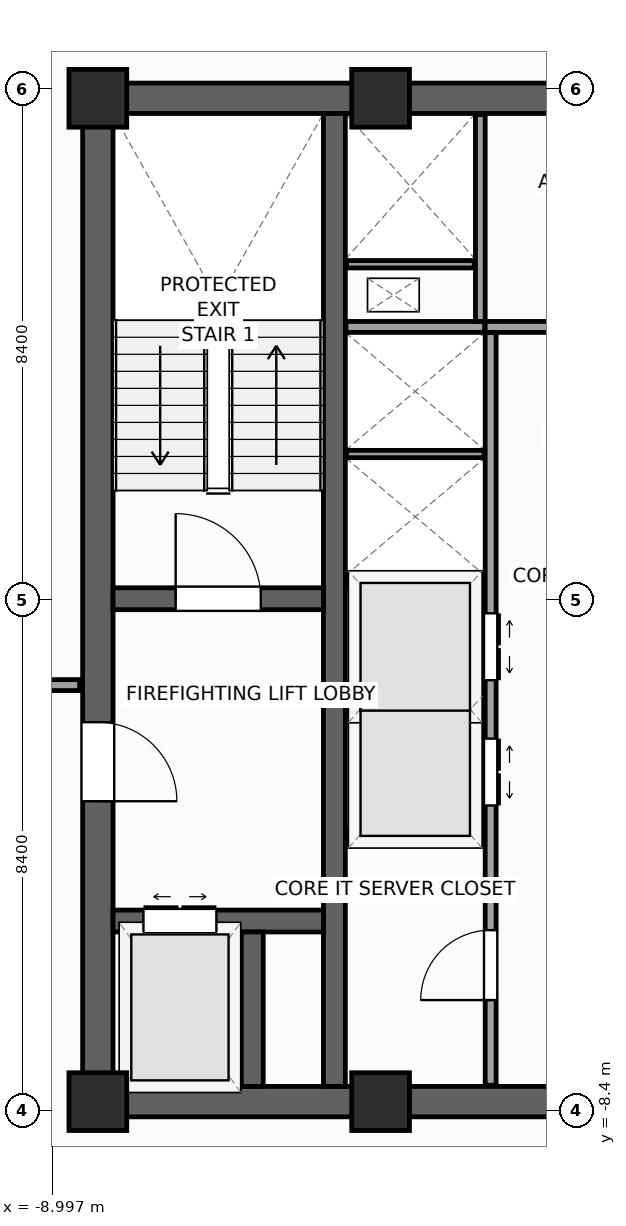
"""IFC4 building model, lengths in metres.
Left out: names, types, materials, properties, quantities, classifications, styles, units other than length and angle.
Written with IfcOpenShell. Run it as: python <this file> out.ifc"""

import sys

from ifc_helpers import new_model, si_unit, direction, frame, frame_2d, origin, origin_2d, place, context, subcontext, project, spatial, rectangle, extrude, source, transform, mapped, element, fill, save


model = new_model("IFC4")
c1 = context("Model", 3, precision=1e-05, world=origin(), true_north=direction((0.0, 1.0)))
c2 = subcontext(c1, "Body", "Model", "MODEL_VIEW")
j1 = project(units=[si_unit("LENGTHUNIT", "METRE"), si_unit("PLANEANGLEUNIT", "RADIAN")], contexts=[c1])
p1 = place(None, origin())
s1 = spatial("IfcSite", under=j1, at=p1, CompositionType="ELEMENT")
p2 = place(p1, origin())
s2 = spatial("IfcBuilding", under=s1, at=p2, CompositionType="ELEMENT")
p3 = place(p2, frame((0.0, 0.0, 205.6)))
s3 = spatial("IfcBuildingStorey", under=s2, at=p3, CompositionType="ELEMENT", Elevation=205.6)
p4 = place(p3, frame((-8.5, -8.25, 0.0), z_axis=(0.0, 0.0, 1.0), x_axis=(1.0, 0.0, 0.0)))
e1 = element("IfcWall", 1, at=p4, inside=s3, PredefinedType="SHEAR", context=c2, shape_type="SweptSolid", body=[
    extrude(rectangle(XDim=17.0, YDim=0.5, at=frame_2d((8.5, 0.0))), origin(), (0.0, 0.0, 1.0), 3.9),
])
p5 = place(p4, frame((7.85, 0.0, 0.0)))
e2 = element("IfcOpeningElement", 2, at=p5, cuts=e1, PredefinedType="OPENING", context=c2, shape_type="SweptSolid", body=[
    extrude(rectangle(XDim=1.3, YDim=2.2, at=frame_2d((0.65, 1.1))), frame((0.0, 0.26, 0.0), z_axis=(0.0, -1.0, 0.0), x_axis=(1.0, 0.0, 0.0)), (0.0, 0.0, 1.0), 0.52),
])
p6 = place(p3, frame((-8.5, 8.25, 0.0), z_axis=(0.0, 0.0, 1.0), x_axis=(1.0, 0.0, 0.0)))
e3 = element("IfcWall", 3, at=p6, inside=s3, PredefinedType="SHEAR", context=c2, shape_type="SweptSolid", body=[
    extrude(rectangle(XDim=17.0, YDim=0.5, at=frame_2d((8.5, 0.0))), origin(), (0.0, 0.0, 1.0), 3.9),
])
p7 = place(p3, frame((-8.25, -8.0, 0.0), z_axis=(0.0, 0.0, 1.0), x_axis=(0.0, 1.0, 0.0)))
e4 = element("IfcWall", 4, at=p7, inside=s3, PredefinedType="SHEAR", context=c2, shape_type="SweptSolid", body=[
    extrude(rectangle(XDim=16.0, YDim=0.5, at=frame_2d((8.0, 0.0))), origin(), (0.0, 0.0, 1.0), 3.9),
])
p8 = place(p7, frame((4.69, 0.0, 0.0)))
e5 = element("IfcOpeningElement", 5, at=p8, cuts=e4, PredefinedType="OPENING", context=c2, shape_type="SweptSolid", body=[
    extrude(rectangle(XDim=1.3, YDim=2.2, at=frame_2d((0.65, 1.1))), frame((0.0, 0.26, 0.0), z_axis=(0.0, -1.0, 0.0), x_axis=(1.0, 0.0, 0.0)), (0.0, 0.0, 1.0), 0.52),
])
p9 = place(p3, frame((-4.36, -8.0, 0.0), z_axis=(0.0, 0.0, 1.0), x_axis=(0.0, 1.0, 0.0)))
e6 = element("IfcWall", 6, at=p9, inside=s3, PredefinedType="SHEAR", context=c2, shape_type="SweptSolid", body=[
    extrude(rectangle(XDim=16.0, YDim=0.36, at=frame_2d((8.0, 0.0))), origin(), (0.0, 0.0, 1.0), 3.9),
])
p10 = place(p3, frame((-8.0, 0.02, 0.0), z_axis=(0.0, 0.0, 1.0), x_axis=(1.0, 0.0, 0.0)))
e7 = element("IfcWall", 7, at=p10, inside=s3, PredefinedType="SHEAR", context=c2, shape_type="SweptSolid", body=[
    extrude(rectangle(XDim=3.46, YDim=0.36, at=frame_2d((1.73, 0.0))), origin(), (0.0, 0.0, 1.0), 3.9),
])
p11 = place(p10, frame((1.03, 0.0, 0.0)))
e8 = element("IfcOpeningElement", 8, at=p11, cuts=e7, PredefinedType="OPENING", context=c2, shape_type="SweptSolid", body=[
    extrude(rectangle(XDim=1.4, YDim=2.2, at=frame_2d((0.7, 1.1))), frame((0.0, 0.19, 0.0), z_axis=(0.0, -1.0, 0.0), x_axis=(1.0, 0.0, 0.0)), (0.0, 0.0, 1.0), 0.38),
])
p12 = place(p3, frame((-8.0, -5.28, 0.0), z_axis=(0.0, 0.0, 1.0), x_axis=(1.0, 0.0, 0.0)))
e9 = element("IfcWall", 9, at=p12, inside=s3, PredefinedType="SHEAR", context=c2, shape_type="SweptSolid", body=[
    extrude(rectangle(XDim=3.46, YDim=0.36, at=frame_2d((1.73, 0.0))), origin(), (0.0, 0.0, 1.0), 3.9),
])
p13 = place(p12, frame((0.5, 0.0, 0.0)))
e10 = element("IfcOpeningElement", 10, at=p13, cuts=e9, PredefinedType="OPENING", context=c2, shape_type="SweptSolid", body=[
    extrude(rectangle(XDim=1.2, YDim=2.25, at=frame_2d((0.6, 1.125))), frame((0.0, 0.19, 0.0), z_axis=(0.0, -1.0, 0.0), x_axis=(1.0, 0.0, 0.0)), (0.0, 0.0, 1.0), 0.38),
])
p14 = place(p3, frame((-5.71, -8.0, 0.0), z_axis=(0.0, 0.0, 1.0), x_axis=(0.0, 1.0, 0.0)))
e11 = element("IfcWall", 11, at=p14, inside=s3, PredefinedType="SHEAR", context=c2, shape_type="SweptSolid", body=[
    extrude(rectangle(XDim=2.54, YDim=0.36, at=frame_2d((1.27, 0.0))), origin(), (0.0, 0.0, 1.0), 3.9),
])
m1 = source(origin(), c2, "Body", "SweptSolid", [
    extrude(rectangle(XDim=0.95, YDim=0.95, at=origin_2d()), origin(), (0.0, 0.0, 1.0), 3.9),
])
for number, where, z_axis, x_axis in (
    (12, (-8.25, -8.25, 0.0), (0.0, 0.0, 1.0), (1.0, 0.0, 0.0)),
    (13, (-8.25, 8.25, 0.0), (0.0, 0.0, 1.0), (1.0, 0.0, 0.0)),
    (14, (-3.6, -8.25, 0.0), (0.0, 0.0, 1.0), (1.0, 0.0, 0.0)),
    (15, (-3.6, 8.25, 0.0), (0.0, 0.0, 1.0), (1.0, 0.0, 0.0)),
):
    element("IfcColumn", number, at=place(p3, frame(where, z_axis=z_axis, x_axis=x_axis)), inside=s3, PredefinedType="PILASTER", context=c2, shape_type="MappedRepresentation", body=[
        mapped(m1, transform((0.0, 0.0, 0.0), scale=1.0)),
    ])
p15 = place(p3, frame((-6.733, 29.154, 0.0), z_axis=(0.0, 0.0, 1.0), x_axis=(-0.629325378072, -0.77714192302, 0.0)))
e16 = element("IfcWall", 16, at=p15, inside=s3, PredefinedType="STANDARD", context=c2, shape_type="SweptSolid", body=[
    extrude(rectangle(XDim=36.84, YDim=0.34, at=frame_2d((18.42, 0.0))), origin(), (0.0, 0.0, 1.0), 2.96),
])
p16 = place(p15, frame((3.721, 0.0, 0.48)))
e17 = element("IfcOpeningElement", 17, at=p16, cuts=e16, PredefinedType="OPENING", context=c2, shape_type="SweptSolid", body=[
    extrude(rectangle(XDim=1.4, YDim=2.4, at=frame_2d((0.7, 1.2))), frame((0.0, 0.18, 0.0), z_axis=(0.0, -1.0, 0.0), x_axis=(1.0, 0.0, 0.0)), (0.0, 0.0, 1.0), 0.36),
])
p17 = place(p15, frame((9.809, 0.0, 0.58)))
e18 = element("IfcOpeningElement", 18, at=p17, cuts=e16, PredefinedType="OPENING", context=c2, shape_type="SweptSolid", body=[
    extrude(rectangle(XDim=1.75, YDim=2.3, at=frame_2d((0.875, 1.15))), frame((0.0, 0.18, 0.0), z_axis=(0.0, -1.0, 0.0), x_axis=(1.0, 0.0, 0.0)), (0.0, 0.0, 1.0), 0.36),
])
p18 = place(p15, frame((16.058, 0.0, 0.58)))
e19 = element("IfcOpeningElement", 19, at=p18, cuts=e16, PredefinedType="OPENING", context=c2, shape_type="SweptSolid", body=[
    extrude(rectangle(XDim=1.75, YDim=2.3, at=frame_2d((0.875, 1.15))), frame((0.0, 0.18, 0.0), z_axis=(0.0, -1.0, 0.0), x_axis=(1.0, 0.0, 0.0)), (0.0, 0.0, 1.0), 0.36),
])
p19 = place(p15, frame((24.176, 0.0, 0.58)))
e20 = element("IfcOpeningElement", 20, at=p19, cuts=e16, PredefinedType="OPENING", context=c2, shape_type="SweptSolid", body=[
    extrude(rectangle(XDim=1.75, YDim=2.3, at=frame_2d((0.875, 1.15))), frame((0.0, 0.18, 0.0), z_axis=(0.0, -1.0, 0.0), x_axis=(1.0, 0.0, 0.0)), (0.0, 0.0, 1.0), 0.36),
])
p20 = place(p15, frame((30.982, 0.0, 0.48)))
e21 = element("IfcOpeningElement", 21, at=p20, cuts=e16, PredefinedType="OPENING", context=c2, shape_type="SweptSolid", body=[
    extrude(rectangle(XDim=1.4, YDim=2.4, at=frame_2d((0.7, 1.2))), frame((0.0, 0.18, 0.0), z_axis=(0.0, -1.0, 0.0), x_axis=(1.0, 0.0, 0.0)), (0.0, 0.0, 1.0), 0.36),
])
p21 = place(p3, frame((-29.154, -6.733, 0.0), z_axis=(0.0, 0.0, 1.0), x_axis=(0.77714192302, -0.629325378072, 0.0)))
e22 = element("IfcWall", 22, at=p21, inside=s3, PredefinedType="STANDARD", context=c2, shape_type="SweptSolid", body=[
    extrude(rectangle(XDim=36.84, YDim=0.34, at=frame_2d((18.42, 0.0))), origin(), (0.0, 0.0, 1.0), 2.96),
])
p22 = place(p21, frame((23.495, 0.0, 0.0)))
e23 = element("IfcOpeningElement", 23, at=p22, cuts=e22, PredefinedType="OPENING", context=c2, shape_type="SweptSolid", body=[
    extrude(rectangle(XDim=1.05, YDim=2.25, at=frame_2d((0.525, 1.125))), frame((0.0, 0.18, 0.0), z_axis=(0.0, -1.0, 0.0), x_axis=(1.0, 0.0, 0.0)), (0.0, 0.0, 1.0), 0.36),
])
p23 = place(p21, frame((3.721, 0.0, 0.48)))
e24 = element("IfcOpeningElement", 24, at=p23, cuts=e22, PredefinedType="OPENING", context=c2, shape_type="SweptSolid", body=[
    extrude(rectangle(XDim=1.4, YDim=2.4, at=frame_2d((0.7, 1.2))), frame((0.0, 0.18, 0.0), z_axis=(0.0, -1.0, 0.0), x_axis=(1.0, 0.0, 0.0)), (0.0, 0.0, 1.0), 0.36),
])
p24 = place(p21, frame((9.809, 0.0, 0.58)))
e25 = element("IfcOpeningElement", 25, at=p24, cuts=e22, PredefinedType="OPENING", context=c2, shape_type="SweptSolid", body=[
    extrude(rectangle(XDim=1.75, YDim=2.3, at=frame_2d((0.875, 1.15))), frame((0.0, 0.18, 0.0), z_axis=(0.0, -1.0, 0.0), x_axis=(1.0, 0.0, 0.0)), (0.0, 0.0, 1.0), 0.36),
])
p25 = place(p21, frame((16.058, 0.0, 0.58)))
e26 = element("IfcOpeningElement", 26, at=p25, cuts=e22, PredefinedType="OPENING", context=c2, shape_type="SweptSolid", body=[
    extrude(rectangle(XDim=1.75, YDim=2.3, at=frame_2d((0.875, 1.15))), frame((0.0, 0.18, 0.0), z_axis=(0.0, -1.0, 0.0), x_axis=(1.0, 0.0, 0.0)), (0.0, 0.0, 1.0), 0.36),
])
p26 = place(p21, frame((25.676, 0.0, 0.58)))
e27 = element("IfcOpeningElement", 27, at=p26, cuts=e22, PredefinedType="OPENING", context=c2, shape_type="SweptSolid", body=[
    extrude(rectangle(XDim=1.75, YDim=2.3, at=frame_2d((0.875, 1.15))), frame((0.0, 0.18, 0.0), z_axis=(0.0, -1.0, 0.0), x_axis=(1.0, 0.0, 0.0)), (0.0, 0.0, 1.0), 0.36),
])
p27 = place(p21, frame((30.982, 0.0, 0.48)))
e28 = element("IfcOpeningElement", 28, at=p27, cuts=e22, PredefinedType="OPENING", context=c2, shape_type="SweptSolid", body=[
    extrude(rectangle(XDim=1.4, YDim=2.4, at=frame_2d((0.7, 1.2))), frame((0.0, 0.18, 0.0), z_axis=(0.0, -1.0, 0.0), x_axis=(1.0, 0.0, 0.0)), (0.0, 0.0, 1.0), 0.36),
])
p28 = place(p3, frame((-1.79, -7.98, 0.0), z_axis=(0.0, 0.0, 1.0), x_axis=(0.0, 1.0, 0.0)))
e29 = element("IfcWall", 29, at=p28, inside=s3, PredefinedType="PARTITIONING", context=c2, shape_type="SweptSolid", body=[
    extrude(rectangle(XDim=12.38, YDim=0.18, at=frame_2d((6.19, 0.0))), origin(), (0.0, 0.0, 1.0), 3.66),
])
p29 = place(p28, frame((4.6, 0.0, 0.0)))
e30 = element("IfcOpeningElement", 30, at=p29, cuts=e29, PredefinedType="OPENING", context=c2, shape_type="SweptSolid", body=[
    extrude(rectangle(XDim=1.1, YDim=2.2, at=frame_2d((0.55, 1.1))), frame((0.0, 0.1, 0.0), z_axis=(0.0, -1.0, 0.0), x_axis=(1.0, 0.0, 0.0)), (0.0, 0.0, 1.0), 0.2),
])
p30 = place(p28, frame((6.66, 0.0, 0.0)))
e31 = element("IfcOpeningElement", 31, at=p30, cuts=e29, PredefinedType="OPENING", context=c2, shape_type="SweptSolid", body=[
    extrude(rectangle(XDim=1.1, YDim=2.2, at=frame_2d((0.55, 1.1))), frame((0.0, 0.1, 0.0), z_axis=(0.0, -1.0, 0.0), x_axis=(1.0, 0.0, 0.0)), (0.0, 0.0, 1.0), 0.2),
])
p31 = place(p28, frame((1.4, 0.0, 0.0)))
e32 = element("IfcOpeningElement", 32, at=p31, cuts=e29, PredefinedType="OPENING", context=c2, shape_type="SweptSolid", body=[
    extrude(rectangle(XDim=1.15, YDim=2.25, at=frame_2d((0.575, 1.125))), frame((0.0, 0.1, 0.0), z_axis=(0.0, -1.0, 0.0), x_axis=(1.0, 0.0, 0.0)), (0.0, 0.0, 1.0), 0.2),
])
p32 = place(p3, frame((-1.88, 4.49, 0.0), z_axis=(0.0, 0.0, 1.0), x_axis=(1.0, 0.0, 0.0)))
e33 = element("IfcWall", 33, at=p32, inside=s3, PredefinedType="PARTITIONING", context=c2, shape_type="SweptSolid", body=[
    extrude(rectangle(XDim=3.76, YDim=0.18, at=frame_2d((1.88, 0.0))), origin(), (0.0, 0.0, 1.0), 3.66),
])
p33 = place(p32, frame((1.305, 0.0, 0.0)))
e34 = element("IfcOpeningElement", 34, at=p33, cuts=e33, PredefinedType="OPENING", context=c2, shape_type="SweptSolid", body=[
    extrude(rectangle(XDim=1.15, YDim=2.25, at=frame_2d((0.575, 1.125))), frame((0.0, 0.1, 0.0), z_axis=(0.0, -1.0, 0.0), x_axis=(1.0, 0.0, 0.0)), (0.0, 0.0, 1.0), 0.2),
])
for number, where, z_axis, x_axis in (
    (35, (-4.17, -3.9, 0.0), (0.0, 0.0, 1.0), (1.0, 0.0, 0.0)),
    (36, (-4.17, 0.3, 0.0), (0.0, 0.0, 1.0), (1.0, 0.0, 0.0)),
    (37, (-4.17, 4.49, 0.0), (0.0, 0.0, 1.0), (1.0, 0.0, 0.0)),
):
    element("IfcWall", number, at=place(p3, frame(where, z_axis=z_axis, x_axis=x_axis)), inside=s3, PredefinedType="PARTITIONING", context=c2, shape_type="SweptSolid", body=[
        extrude(rectangle(XDim=2.28, YDim=0.18, at=frame_2d((1.14, 0.0))), origin(), (0.0, 0.0, 1.0), 3.66),
    ])
for number, where, z_axis, x_axis in (
    (38, (-4.16, -1.8, 0.0), (0.0, 0.0, 1.0), (1.0, 0.0, 0.0)),
    (39, (-4.16, 2.4, 0.0), (0.0, 0.0, 1.0), (1.0, 0.0, 0.0)),
):
    element("IfcWall", number, at=place(p3, frame(where, z_axis=z_axis, x_axis=x_axis)), inside=s3, PredefinedType="PARTITIONING", context=c2, shape_type="SweptSolid", body=[
        extrude(rectangle(XDim=2.26, YDim=0.12, at=frame_2d((1.13, 0.0))), origin(), (0.0, 0.0, 1.0), 3.66),
    ])
p34 = place(p3, frame((-1.96, 4.58, 0.0), z_axis=(0.0, 0.0, 1.0), x_axis=(0.0, 1.0, 0.0)))
e40 = element("IfcWall", 40, at=p34, inside=s3, PredefinedType="PARTITIONING", context=c2, shape_type="SweptSolid", body=[
    extrude(rectangle(XDim=3.4, YDim=0.16, at=frame_2d((1.7, 0.0))), origin(), (0.0, 0.0, 1.0), 3.66),
])
p35 = place(p3, frame((-4.16, 5.52, 0.0), z_axis=(0.0, 0.0, 1.0), x_axis=(1.0, 0.0, 0.0)))
e41 = element("IfcWall", 41, at=p35, inside=s3, PredefinedType="PARTITIONING", context=c2, shape_type="SweptSolid", body=[
    extrude(rectangle(XDim=2.1, YDim=0.12, at=frame_2d((1.05, 0.0))), origin(), (0.0, 0.0, 1.0), 3.66),
])
p36 = place(p3, frame((-11.45, -1.4, 0.0), z_axis=(0.0, 0.0, 1.0), x_axis=(1.0, 0.0, 0.0)))
e42 = element("IfcWall", 42, at=p36, inside=s3, PredefinedType="PARTITIONING", context=c2, shape_type="SweptSolid", body=[
    extrude(rectangle(XDim=2.9, YDim=0.18, at=frame_2d((1.45, 0.0))), origin(), (0.0, 0.0, 1.0), 3.66),
])
p37 = place(p36, frame((0.9, 0.0, 0.0)))
e43 = element("IfcOpeningElement", 43, at=p37, cuts=e42, PredefinedType="OPENING", context=c2, shape_type="SweptSolid", body=[
    extrude(rectangle(XDim=1.1, YDim=2.2, at=frame_2d((0.55, 1.1))), frame((0.0, 0.1, 0.0), z_axis=(0.0, -1.0, 0.0), x_axis=(1.0, 0.0, 0.0)), (0.0, 0.0, 1.0), 0.2),
])
m2 = source(origin(), c2, "Body", "SweptSolid", [
    extrude(rectangle(XDim=1.4, YDim=2.2, at=frame_2d((0.7, 1.1))), frame((0.0, 0.025, 0.0), z_axis=(0.0, -1.0, 0.0), x_axis=(1.0, 0.0, 0.0)), (0.0, 0.0, 1.0), 0.05),
])
p38 = place(p11, origin())
e44 = element("IfcDoor", 44, at=p38, inside=s3, OperationType="SINGLE_SWING_LEFT", PredefinedType="DOOR", context=c2, shape_type="MappedRepresentation", body=[
    mapped(m2, transform((0.0, 0.0, 0.0), scale=1.0)),
])
fill(e8, e44)
m3 = source(origin(), c2, "Body", "SweptSolid", [
    extrude(rectangle(XDim=1.3, YDim=2.2, at=frame_2d((0.65, 1.1))), frame((0.0, 0.025, 0.0), z_axis=(0.0, -1.0, 0.0), x_axis=(1.0, 0.0, 0.0)), (0.0, 0.0, 1.0), 0.05),
])
p39 = place(p8, frame((1.3, 0.0, 0.0), z_axis=(0.0, 0.0, 1.0), x_axis=(-1.0, 0.0, 0.0)))
e45 = element("IfcDoor", 45, at=p39, inside=s3, OperationType="SINGLE_SWING_LEFT", PredefinedType="DOOR", context=c2, shape_type="MappedRepresentation", body=[
    mapped(m3, transform((0.0, 0.0, 0.0), scale=1.0)),
])
fill(e5, e45)
m4 = source(origin(), c2, "Body", "SweptSolid", [
    extrude(rectangle(XDim=1.2, YDim=2.25, at=frame_2d((0.6, 1.125))), frame((0.0, 0.025, 0.0), z_axis=(0.0, -1.0, 0.0), x_axis=(1.0, 0.0, 0.0)), (0.0, 0.0, 1.0), 0.05),
])
p40 = place(p13, origin())
e46 = element("IfcDoor", 46, at=p40, inside=s3, OperationType="DOUBLE_DOOR_SLIDING", PredefinedType="DOOR", context=c2, shape_type="MappedRepresentation", body=[
    mapped(m4, transform((0.0, 0.0, 0.0), scale=1.0)),
])
fill(e10, e46)
m5 = source(origin(), c2, "Body", "SweptSolid", [
    extrude(rectangle(XDim=1.1, YDim=2.2, at=frame_2d((0.55, 1.1))), frame((0.0, 0.025, 0.0), z_axis=(0.0, -1.0, 0.0), x_axis=(1.0, 0.0, 0.0)), (0.0, 0.0, 1.0), 0.05),
])
p41 = place(p29, frame((1.1, 0.0, 0.0), z_axis=(0.0, 0.0, 1.0), x_axis=(-1.0, 0.0, 0.0)))
e47 = element("IfcDoor", 47, at=p41, inside=s3, OperationType="DOUBLE_DOOR_SLIDING", PredefinedType="DOOR", context=c2, shape_type="MappedRepresentation", body=[
    mapped(m5, transform((0.0, 0.0, 0.0), scale=1.0)),
])
fill(e30, e47)
p42 = place(p30, frame((1.1, 0.0, 0.0), z_axis=(0.0, 0.0, 1.0), x_axis=(-1.0, 0.0, 0.0)))
e48 = element("IfcDoor", 48, at=p42, inside=s3, OperationType="DOUBLE_DOOR_SLIDING", PredefinedType="DOOR", context=c2, shape_type="MappedRepresentation", body=[
    mapped(m5, transform((0.0, 0.0, 0.0), scale=1.0)),
])
fill(e31, e48)
m6 = source(origin(), c2, "Body", "SweptSolid", [
    extrude(rectangle(XDim=1.15, YDim=2.25, at=frame_2d((0.575, 1.125))), frame((0.0, 0.025, 0.0), z_axis=(0.0, -1.0, 0.0), x_axis=(1.0, 0.0, 0.0)), (0.0, 0.0, 1.0), 0.05),
])
p43 = place(p31, origin())
e49 = element("IfcDoor", 49, at=p43, inside=s3, OperationType="SINGLE_SWING_LEFT", PredefinedType="DOOR", context=c2, shape_type="MappedRepresentation", body=[
    mapped(m6, transform((0.0, 0.0, 0.0), scale=1.0)),
])
fill(e32, e49)
save(model, sys.argv[1])
